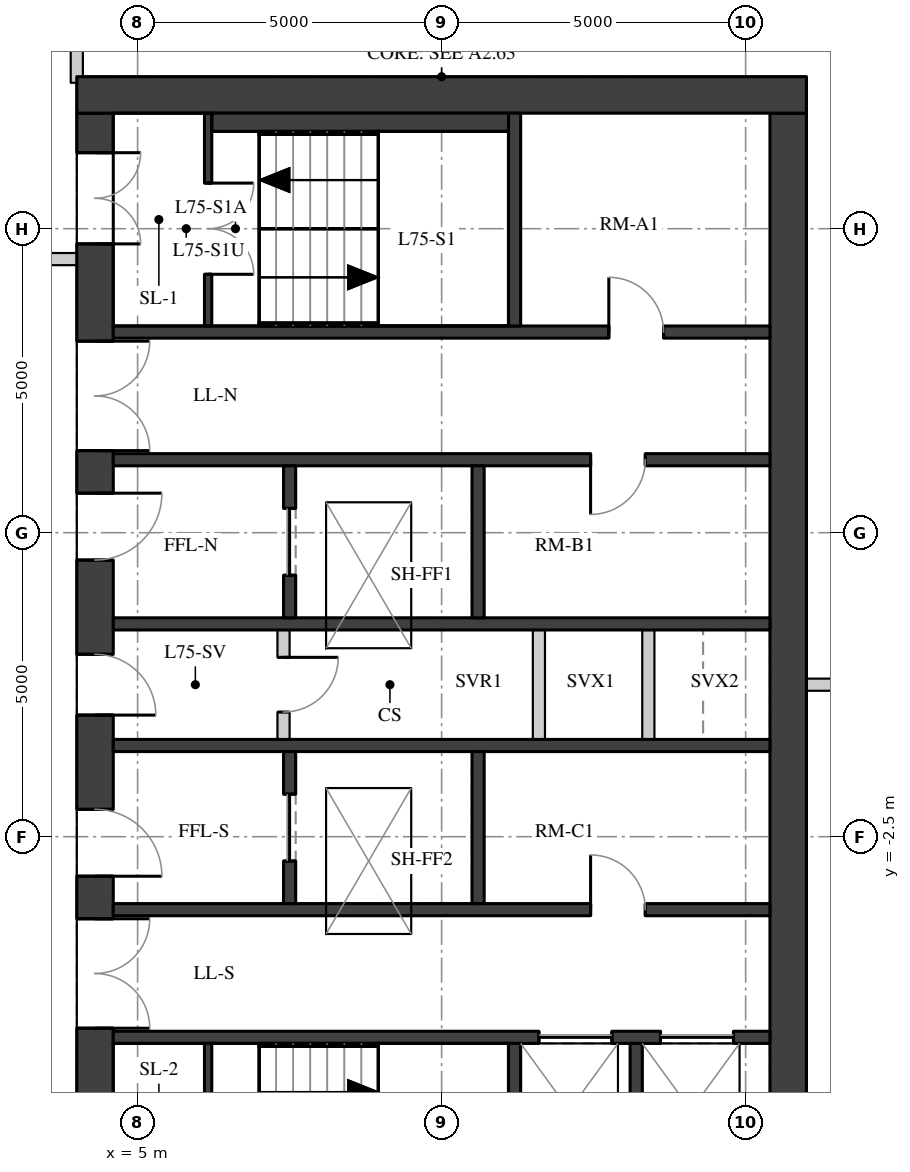
"""IFC4 building model, lengths in metres.
Left out: names, types, materials, properties, quantities, classifications, styles, units other than length and angle.
Written with IfcOpenShell. Run it as: python <this file> out.ifc"""

import sys

from ifc_helpers import new_model, si_unit, direction, frame, frame_2d, origin, place, context, subcontext, project, spatial, rectangle, extrude, element, fill, save


model = new_model("IFC4")
c1 = context("Model", 3, precision=1e-05, world=origin(), true_north=direction((0.0, 1.0)))
c2 = subcontext(c1, "Body", "Model", "MODEL_VIEW")
j1 = project(units=[si_unit("LENGTHUNIT", "METRE"), si_unit("PLANEANGLEUNIT", "RADIAN")], contexts=[c1])
p1 = place(None, origin())
s1 = spatial("IfcSite", under=j1, at=p1, CompositionType="ELEMENT")
p2 = place(p1, origin())
s2 = spatial("IfcBuilding", under=s1, at=p2, CompositionType="ELEMENT")
p3 = place(p2, frame((0.0, 0.0, 264.2)))
s3 = spatial("IfcBuildingStorey", under=s2, at=p3, CompositionType="ELEMENT", Elevation=264.2)
p4 = place(p3, frame((4.3, -9.4, 0.0), z_axis=(0.0, 0.0, 1.0), x_axis=(0.0, 1.0, 0.0)))
e1 = element("IfcWall", 1, at=p4, inside=s3, PredefinedType="SHEAR", context=c2, shape_type="SweptSolid", body=[
    extrude(rectangle(XDim=18.8, YDim=0.6, at=frame_2d((9.4, 0.0))), origin(), (0.0, 0.0, 1.0), 4.59),
])
p5 = place(p4, frame((0.65, 0.0, 0.0)))
e2 = element("IfcOpeningElement", 2, at=p5, cuts=e1, PredefinedType="OPENING", context=c2, shape_type="SweptSolid", body=[
    extrude(rectangle(XDim=1.5, YDim=2.1, at=frame_2d((0.75, 1.05))), frame((0.0, 0.31, 0.0), z_axis=(0.0, -1.0, 0.0), x_axis=(1.0, 0.0, 0.0)), (0.0, 0.0, 1.0), 0.62),
])
p6 = place(p4, frame((3.75, 0.0, 0.0)))
e3 = element("IfcOpeningElement", 3, at=p6, cuts=e1, PredefinedType="OPENING", context=c2, shape_type="SweptSolid", body=[
    extrude(rectangle(XDim=1.8, YDim=2.1, at=frame_2d((0.9, 1.05))), frame((0.0, 0.31, 0.0), z_axis=(0.0, -1.0, 0.0), x_axis=(1.0, 0.0, 0.0)), (0.0, 0.0, 1.0), 0.62),
])
p7 = place(p4, frame((6.25, 0.0, 0.0)))
e4 = element("IfcOpeningElement", 4, at=p7, cuts=e1, PredefinedType="OPENING", context=c2, shape_type="SweptSolid", body=[
    extrude(rectangle(XDim=1.1, YDim=2.1, at=frame_2d((0.55, 1.05))), frame((0.0, 0.31, 0.0), z_axis=(0.0, -1.0, 0.0), x_axis=(1.0, 0.0, 0.0)), (0.0, 0.0, 1.0), 0.62),
])
p8 = place(p4, frame((8.9, 0.0, 0.0)))
e5 = element("IfcOpeningElement", 5, at=p8, cuts=e1, PredefinedType="OPENING", context=c2, shape_type="SweptSolid", body=[
    extrude(rectangle(XDim=1.0, YDim=2.1, at=frame_2d((0.5, 1.05))), frame((0.0, 0.31, 0.0), z_axis=(0.0, -1.0, 0.0), x_axis=(1.0, 0.0, 0.0)), (0.0, 0.0, 1.0), 0.62),
])
p9 = place(p4, frame((11.45, 0.0, 0.0)))
e6 = element("IfcOpeningElement", 6, at=p9, cuts=e1, PredefinedType="OPENING", context=c2, shape_type="SweptSolid", body=[
    extrude(rectangle(XDim=1.1, YDim=2.1, at=frame_2d((0.55, 1.05))), frame((0.0, 0.31, 0.0), z_axis=(0.0, -1.0, 0.0), x_axis=(1.0, 0.0, 0.0)), (0.0, 0.0, 1.0), 0.62),
])
p10 = place(p4, frame((13.25, 0.0, 0.0)))
e7 = element("IfcOpeningElement", 7, at=p10, cuts=e1, PredefinedType="OPENING", context=c2, shape_type="SweptSolid", body=[
    extrude(rectangle(XDim=1.8, YDim=2.1, at=frame_2d((0.9, 1.05))), frame((0.0, 0.31, 0.0), z_axis=(0.0, -1.0, 0.0), x_axis=(1.0, 0.0, 0.0)), (0.0, 0.0, 1.0), 0.62),
])
p11 = place(p4, frame((16.65, 0.0, 0.0)))
e8 = element("IfcOpeningElement", 8, at=p11, cuts=e1, PredefinedType="OPENING", context=c2, shape_type="SweptSolid", body=[
    extrude(rectangle(XDim=1.5, YDim=2.1, at=frame_2d((0.75, 1.05))), frame((0.0, 0.31, 0.0), z_axis=(0.0, -1.0, 0.0), x_axis=(1.0, 0.0, 0.0)), (0.0, 0.0, 1.0), 0.62),
])
p12 = place(p3, frame((15.7, -9.4, 0.0), z_axis=(0.0, 0.0, 1.0), x_axis=(0.0, 1.0, 0.0)))
e9 = element("IfcWall", 9, at=p12, inside=s3, PredefinedType="SHEAR", context=c2, shape_type="SweptSolid", body=[
    extrude(rectangle(XDim=18.8, YDim=0.6, at=frame_2d((9.4, 0.0))), origin(), (0.0, 0.0, 1.0), 4.59),
])
p13 = place(p3, frame((4.0, 9.7, 0.0), z_axis=(0.0, 0.0, 1.0), x_axis=(1.0, 0.0, 0.0)))
e10 = element("IfcWall", 10, at=p13, inside=s3, PredefinedType="SHEAR", context=c2, shape_type="SweptSolid", body=[
    extrude(rectangle(XDim=12.0, YDim=0.6, at=frame_2d((6.0, 0.0))), origin(), (0.0, 0.0, 1.0), 4.59),
])
p14 = place(p3, frame((4.6, 5.8, 0.0), z_axis=(0.0, 0.0, 1.0), x_axis=(1.0, 0.0, 0.0)))
e11 = element("IfcWall", 11, at=p14, inside=s3, PredefinedType="SHEAR", context=c2, shape_type="SweptSolid", body=[
    extrude(rectangle(XDim=10.8, YDim=0.2, at=frame_2d((5.4, 0.0))), origin(), (0.0, 0.0, 1.0), 4.59),
])
p15 = place(p14, frame((8.15, 0.0, 0.0)))
e12 = element("IfcOpeningElement", 12, at=p15, cuts=e11, PredefinedType="OPENING", context=c2, shape_type="SweptSolid", body=[
    extrude(rectangle(XDim=0.9, YDim=2.1, at=frame_2d((0.45, 1.05))), frame((0.0, 0.11, 0.0), z_axis=(0.0, -1.0, 0.0), x_axis=(1.0, 0.0, 0.0)), (0.0, 0.0, 1.0), 0.22),
])
p16 = place(p3, frame((4.6, 3.7, 0.0), z_axis=(0.0, 0.0, 1.0), x_axis=(1.0, 0.0, 0.0)))
e13 = element("IfcWall", 13, at=p16, inside=s3, PredefinedType="SHEAR", context=c2, shape_type="SweptSolid", body=[
    extrude(rectangle(XDim=10.8, YDim=0.2, at=frame_2d((5.4, 0.0))), origin(), (0.0, 0.0, 1.0), 4.59),
])
p17 = place(p16, frame((7.85, 0.0, 0.0)))
e14 = element("IfcOpeningElement", 14, at=p17, cuts=e13, PredefinedType="OPENING", context=c2, shape_type="SweptSolid", body=[
    extrude(rectangle(XDim=0.9, YDim=2.1, at=frame_2d((0.45, 1.05))), frame((0.0, 0.11, 0.0), z_axis=(0.0, -1.0, 0.0), x_axis=(1.0, 0.0, 0.0)), (0.0, 0.0, 1.0), 0.22),
])
for number, where, z_axis, x_axis in (
    (15, (4.6, 1.0, 0.0), (0.0, 0.0, 1.0), (1.0, 0.0, 0.0)),
    (16, (4.6, -1.0, 0.0), (0.0, 0.0, 1.0), (1.0, 0.0, 0.0)),
):
    element("IfcWall", number, at=place(p3, frame(where, z_axis=z_axis, x_axis=x_axis)), inside=s3, PredefinedType="SHEAR", context=c2, shape_type="SweptSolid", body=[
        extrude(rectangle(XDim=10.8, YDim=0.2, at=frame_2d((5.4, 0.0))), origin(), (0.0, 0.0, 1.0), 4.59),
    ])
p18 = place(p3, frame((4.6, -3.7, 0.0), z_axis=(0.0, 0.0, 1.0), x_axis=(1.0, 0.0, 0.0)))
e17 = element("IfcWall", 17, at=p18, inside=s3, PredefinedType="SHEAR", context=c2, shape_type="SweptSolid", body=[
    extrude(rectangle(XDim=10.8, YDim=0.2, at=frame_2d((5.4, 0.0))), origin(), (0.0, 0.0, 1.0), 4.59),
])
p19 = place(p18, frame((7.85, 0.0, 0.0)))
e18 = element("IfcOpeningElement", 18, at=p19, cuts=e17, PredefinedType="OPENING", context=c2, shape_type="SweptSolid", body=[
    extrude(rectangle(XDim=0.9, YDim=2.1, at=frame_2d((0.45, 1.05))), frame((0.0, 0.11, 0.0), z_axis=(0.0, -1.0, 0.0), x_axis=(1.0, 0.0, 0.0)), (0.0, 0.0, 1.0), 0.22),
])
p20 = place(p3, frame((4.6, -5.8, 0.0), z_axis=(0.0, 0.0, 1.0), x_axis=(1.0, 0.0, 0.0)))
e19 = element("IfcWall", 19, at=p20, inside=s3, PredefinedType="SHEAR", context=c2, shape_type="SweptSolid", body=[
    extrude(rectangle(XDim=10.8, YDim=0.2, at=frame_2d((5.4, 0.0))), origin(), (0.0, 0.0, 1.0), 4.59),
])
p21 = place(p20, frame((7.0, 0.0, 0.0)))
e20 = element("IfcOpeningElement", 20, at=p21, cuts=e19, PredefinedType="OPENING", context=c2, shape_type="SweptSolid", body=[
    extrude(rectangle(XDim=1.2, YDim=2.1, at=frame_2d((0.6, 1.05))), frame((0.0, 0.11, 0.0), z_axis=(0.0, -1.0, 0.0), x_axis=(1.0, 0.0, 0.0)), (0.0, 0.0, 1.0), 0.22),
])
p22 = place(p20, frame((9.0, 0.0, 0.0)))
e21 = element("IfcOpeningElement", 21, at=p22, cuts=e19, PredefinedType="OPENING", context=c2, shape_type="SweptSolid", body=[
    extrude(rectangle(XDim=1.2, YDim=2.1, at=frame_2d((0.6, 1.05))), frame((0.0, 0.11, 0.0), z_axis=(0.0, -1.0, 0.0), x_axis=(1.0, 0.0, 0.0)), (0.0, 0.0, 1.0), 0.22),
])
for number, where, z_axis, x_axis in (
    (22, (11.2, 5.9, 0.0), (0.0, 0.0, 1.0), (0.0, 1.0, 0.0)),
    (23, (11.2, -9.4, 0.0), (0.0, 0.0, 1.0), (0.0, 1.0, 0.0)),
    (24, (13.2, -9.4, 0.0), (0.0, 0.0, 1.0), (0.0, 1.0, 0.0)),
):
    element("IfcWall", number, at=place(p3, frame(where, z_axis=z_axis, x_axis=x_axis)), inside=s3, PredefinedType="SHEAR", context=c2, shape_type="SweptSolid", body=[
        extrude(rectangle(XDim=3.5, YDim=0.2, at=frame_2d((1.75, 0.0))), origin(), (0.0, 0.0, 1.0), 4.59),
    ])
p23 = place(p3, frame((7.5, 1.1, 0.0), z_axis=(0.0, 0.0, 1.0), x_axis=(0.0, 1.0, 0.0)))
e25 = element("IfcWall", 25, at=p23, inside=s3, PredefinedType="SHEAR", context=c2, shape_type="SweptSolid", body=[
    extrude(rectangle(XDim=2.5, YDim=0.2, at=frame_2d((1.25, 0.0))), origin(), (0.0, 0.0, 1.0), 4.59),
])
p24 = place(p23, frame((0.7, 0.0, 0.0)))
e26 = element("IfcOpeningElement", 26, at=p24, cuts=e25, PredefinedType="OPENING", context=c2, shape_type="SweptSolid", body=[
    extrude(rectangle(XDim=1.1, YDim=2.1, at=frame_2d((0.55, 1.05))), frame((0.0, 0.11, 0.0), z_axis=(0.0, -1.0, 0.0), x_axis=(1.0, 0.0, 0.0)), (0.0, 0.0, 1.0), 0.22),
])
p25 = place(p3, frame((7.5, -3.6, 0.0), z_axis=(0.0, 0.0, 1.0), x_axis=(0.0, 1.0, 0.0)))
e27 = element("IfcWall", 27, at=p25, inside=s3, PredefinedType="SHEAR", context=c2, shape_type="SweptSolid", body=[
    extrude(rectangle(XDim=2.5, YDim=0.2, at=frame_2d((1.25, 0.0))), origin(), (0.0, 0.0, 1.0), 4.59),
])
p26 = place(p25, frame((0.7, 0.0, 0.0)))
e28 = element("IfcOpeningElement", 28, at=p26, cuts=e27, PredefinedType="OPENING", context=c2, shape_type="SweptSolid", body=[
    extrude(rectangle(XDim=1.1, YDim=2.1, at=frame_2d((0.55, 1.05))), frame((0.0, 0.11, 0.0), z_axis=(0.0, -1.0, 0.0), x_axis=(1.0, 0.0, 0.0)), (0.0, 0.0, 1.0), 0.22),
])
for number, where, z_axis, x_axis in (
    (29, (10.6, 1.1, 0.0), (0.0, 0.0, 1.0), (0.0, 1.0, 0.0)),
    (30, (10.6, -3.6, 0.0), (0.0, 0.0, 1.0), (0.0, 1.0, 0.0)),
):
    element("IfcWall", number, at=place(p3, frame(where, z_axis=z_axis, x_axis=x_axis)), inside=s3, PredefinedType="SHEAR", context=c2, shape_type="SweptSolid", body=[
        extrude(rectangle(XDim=2.5, YDim=0.2, at=frame_2d((1.25, 0.0))), origin(), (0.0, 0.0, 1.0), 4.59),
    ])
p27 = place(p3, frame((6.16, 5.9, 0.0), z_axis=(0.0, 0.0, 1.0), x_axis=(0.0, 1.0, 0.0)))
e31 = element("IfcWall", 31, at=p27, inside=s3, PredefinedType="SHEAR", context=c2, shape_type="SweptSolid", body=[
    extrude(rectangle(XDim=3.5, YDim=0.12, at=frame_2d((1.75, 0.0))), origin(), (0.0, 0.0, 1.0), 2.29),
])
p28 = place(p27, frame((0.85, 0.0, 0.0)))
e32 = element("IfcOpeningElement", 32, at=p28, cuts=e31, PredefinedType="OPENING", context=c2, shape_type="SweptSolid", body=[
    extrude(rectangle(XDim=1.5, YDim=2.1, at=frame_2d((0.75, 1.05))), frame((0.0, 0.07, 0.0), z_axis=(0.0, -1.0, 0.0), x_axis=(1.0, 0.0, 0.0)), (0.0, 0.0, 1.0), 0.14),
])
p29 = place(p3, frame((6.16, -9.4, 0.0), z_axis=(0.0, 0.0, 1.0), x_axis=(0.0, 1.0, 0.0)))
e33 = element("IfcWall", 33, at=p29, inside=s3, PredefinedType="SHEAR", context=c2, shape_type="SweptSolid", body=[
    extrude(rectangle(XDim=3.5, YDim=0.12, at=frame_2d((1.75, 0.0))), origin(), (0.0, 0.0, 1.0), 2.29),
])
p30 = place(p29, frame((1.15, 0.0, 0.0)))
e34 = element("IfcOpeningElement", 34, at=p30, cuts=e33, PredefinedType="OPENING", context=c2, shape_type="SweptSolid", body=[
    extrude(rectangle(XDim=1.5, YDim=2.1, at=frame_2d((0.75, 1.05))), frame((0.0, 0.07, 0.0), z_axis=(0.0, -1.0, 0.0), x_axis=(1.0, 0.0, 0.0)), (0.0, 0.0, 1.0), 0.14),
])
p31 = place(p3, frame((7.4, -0.9, 0.0), z_axis=(0.0, 0.0, 1.0), x_axis=(0.0, 1.0, 0.0)))
e35 = element("IfcWall", 35, at=p31, inside=s3, PredefinedType="PARTITIONING", context=c2, shape_type="SweptSolid", body=[
    extrude(rectangle(XDim=1.8, YDim=0.2, at=frame_2d((0.9, 0.0))), origin(), (0.0, 0.0, 1.0), 4.59),
])
p32 = place(p31, frame((0.45, 0.0, 0.0)))
e36 = element("IfcOpeningElement", 36, at=p32, cuts=e35, PredefinedType="OPENING", context=c2, shape_type="SweptSolid", body=[
    extrude(rectangle(XDim=0.9, YDim=2.1, at=frame_2d((0.45, 1.05))), frame((0.0, 0.11, 0.0), z_axis=(0.0, -1.0, 0.0), x_axis=(1.0, 0.0, 0.0)), (0.0, 0.0, 1.0), 0.22),
])
for number, where, z_axis, x_axis in (
    (37, (11.6, -0.9, 0.0), (0.0, 0.0, 1.0), (0.0, 1.0, 0.0)),
    (38, (13.4, -0.9, 0.0), (0.0, 0.0, 1.0), (0.0, 1.0, 0.0)),
):
    element("IfcWall", number, at=place(p3, frame(where, z_axis=z_axis, x_axis=x_axis)), inside=s3, PredefinedType="PARTITIONING", context=c2, shape_type="SweptSolid", body=[
        extrude(rectangle(XDim=1.8, YDim=0.2, at=frame_2d((0.9, 0.0))), origin(), (0.0, 0.0, 1.0), 4.59),
    ])
p33 = place(p3, frame((6.22, 9.25, 0.0), z_axis=(0.0, 0.0, 1.0), x_axis=(1.0, 0.0, 0.0)))
e39 = element("IfcWall", 39, at=p33, inside=s3, PredefinedType="PARTITIONING", context=c2, shape_type="SweptSolid", body=[
    extrude(rectangle(XDim=4.88, YDim=0.3, at=frame_2d((2.44, 0.0))), origin(), (0.0, 0.0, 1.0), 4.59),
])
p34 = place(p3, frame((15.998, 0.0, 0.0), z_axis=(0.0, 0.0, 1.0), x_axis=(1.0, 0.0, 0.0)))
e40 = element("IfcWall", 40, at=p34, inside=s3, PredefinedType="PARTITIONING", context=c2, shape_type="SweptSolid", body=[
    extrude(rectangle(XDim=8.232, YDim=0.2, at=frame_2d((4.116, 0.0))), origin(), (0.0, 0.0, 1.0), 4.14),
])
p35 = place(p3, frame((-9.6, 7.0, 0.0), z_axis=(0.0, 0.0, 1.0), x_axis=(1.0, 0.0, 0.0)))
e41 = element("IfcWall", 41, at=p35, inside=s3, PredefinedType="PARTITIONING", context=c2, shape_type="SweptSolid", body=[
    extrude(rectangle(XDim=13.602, YDim=0.2, at=frame_2d((6.801, 0.0))), origin(), (0.0, 0.0, 1.0), 4.04),
])
p36 = place(p35, frame((9.201, 0.0, 0.0)))
e42 = element("IfcOpeningElement", 42, at=p36, cuts=e41, PredefinedType="OPENING", context=c2, shape_type="SweptSolid", body=[
    extrude(rectangle(XDim=1.8, YDim=2.1, at=frame_2d((0.9, 1.05))), frame((0.0, 0.11, 0.0), z_axis=(0.0, -1.0, 0.0), x_axis=(1.0, 0.0, 0.0)), (0.0, 0.0, 1.0), 0.22),
])
p37 = place(p3, frame((4.0, 9.9, 0.0), z_axis=(0.0, 0.0, 1.0), x_axis=(0.0, 1.0, 0.0)))
e43 = element("IfcWall", 43, at=p37, inside=s3, PredefinedType="PARTITIONING", context=c2, shape_type="SweptSolid", body=[
    extrude(rectangle(XDim=4.0, YDim=0.2, at=frame_2d((2.0, 0.0))), origin(), (0.0, 0.0, 1.0), 4.59),
])
p38 = place(p6, origin())
e44 = element("IfcDoor", 44, at=p38, inside=s3, OperationType="DOUBLE_DOOR_SINGLE_SWING", PredefinedType="DOOR", context=c2, shape_type="SweptSolid", body=[
    extrude(rectangle(XDim=1.8, YDim=2.1, at=frame_2d((0.9, 1.05))), frame((0.0, 0.025, 0.0), z_axis=(0.0, -1.0, 0.0), x_axis=(1.0, 0.0, 0.0)), (0.0, 0.0, 1.0), 0.05),
])
fill(e3, e44)
p39 = place(p7, origin())
e45 = element("IfcDoor", 45, at=p39, inside=s3, OperationType="SINGLE_SWING_RIGHT", PredefinedType="DOOR", context=c2, shape_type="SweptSolid", body=[
    extrude(rectangle(XDim=1.1, YDim=2.1, at=frame_2d((0.55, 1.05))), frame((0.0, 0.025, 0.0), z_axis=(0.0, -1.0, 0.0), x_axis=(1.0, 0.0, 0.0)), (0.0, 0.0, 1.0), 0.05),
])
fill(e4, e45)
p40 = place(p8, origin())
e46 = element("IfcDoor", 46, at=p40, inside=s3, OperationType="SINGLE_SWING_RIGHT", PredefinedType="DOOR", context=c2, shape_type="SweptSolid", body=[
    extrude(rectangle(XDim=1.0, YDim=2.1, at=frame_2d((0.5, 1.05))), frame((0.0, 0.025, 0.0), z_axis=(0.0, -1.0, 0.0), x_axis=(1.0, 0.0, 0.0)), (0.0, 0.0, 1.0), 0.05),
])
fill(e5, e46)
p41 = place(p9, origin())
e47 = element("IfcDoor", 47, at=p41, inside=s3, OperationType="SINGLE_SWING_LEFT", PredefinedType="DOOR", context=c2, shape_type="SweptSolid", body=[
    extrude(rectangle(XDim=1.1, YDim=2.1, at=frame_2d((0.55, 1.05))), frame((0.0, 0.025, 0.0), z_axis=(0.0, -1.0, 0.0), x_axis=(1.0, 0.0, 0.0)), (0.0, 0.0, 1.0), 0.05),
])
fill(e6, e47)
p42 = place(p10, origin())
e48 = element("IfcDoor", 48, at=p42, inside=s3, OperationType="DOUBLE_DOOR_SINGLE_SWING", PredefinedType="DOOR", context=c2, shape_type="SweptSolid", body=[
    extrude(rectangle(XDim=1.8, YDim=2.1, at=frame_2d((0.9, 1.05))), frame((0.0, 0.025, 0.0), z_axis=(0.0, -1.0, 0.0), x_axis=(1.0, 0.0, 0.0)), (0.0, 0.0, 1.0), 0.05),
])
fill(e7, e48)
p43 = place(p11, origin())
e49 = element("IfcDoor", 49, at=p43, inside=s3, OperationType="DOUBLE_DOOR_SINGLE_SWING", PredefinedType="DOOR", context=c2, shape_type="SweptSolid", body=[
    extrude(rectangle(XDim=1.5, YDim=2.1, at=frame_2d((0.75, 1.05))), frame((0.0, 0.025, 0.0), z_axis=(0.0, -1.0, 0.0), x_axis=(1.0, 0.0, 0.0)), (0.0, 0.0, 1.0), 0.05),
])
fill(e8, e49)
p44 = place(p28, origin())
e50 = element("IfcDoor", 50, at=p44, inside=s3, OperationType="DOUBLE_DOOR_SINGLE_SWING", PredefinedType="DOOR", context=c2, shape_type="SweptSolid", body=[
    extrude(rectangle(XDim=1.5, YDim=2.1, at=frame_2d((0.75, 1.05))), frame((0.0, 0.025, 0.0), z_axis=(0.0, -1.0, 0.0), x_axis=(1.0, 0.0, 0.0)), (0.0, 0.0, 1.0), 0.05),
])
fill(e32, e50)
p45 = place(p15, origin())
e51 = element("IfcDoor", 51, at=p45, inside=s3, OperationType="SINGLE_SWING_LEFT", PredefinedType="DOOR", context=c2, shape_type="SweptSolid", body=[
    extrude(rectangle(XDim=0.9, YDim=2.1, at=frame_2d((0.45, 1.05))), frame((0.0, 0.025, 0.0), z_axis=(0.0, -1.0, 0.0), x_axis=(1.0, 0.0, 0.0)), (0.0, 0.0, 1.0), 0.05),
])
fill(e12, e51)
p46 = place(p17, origin())
e52 = element("IfcDoor", 52, at=p46, inside=s3, OperationType="SINGLE_SWING_RIGHT", PredefinedType="DOOR", context=c2, shape_type="SweptSolid", body=[
    extrude(rectangle(XDim=0.9, YDim=2.1, at=frame_2d((0.45, 1.05))), frame((0.0, 0.025, 0.0), z_axis=(0.0, -1.0, 0.0), x_axis=(1.0, 0.0, 0.0)), (0.0, 0.0, 1.0), 0.05),
])
fill(e14, e52)
p47 = place(p19, origin())
e53 = element("IfcDoor", 53, at=p47, inside=s3, OperationType="SINGLE_SWING_LEFT", PredefinedType="DOOR", context=c2, shape_type="SweptSolid", body=[
    extrude(rectangle(XDim=0.9, YDim=2.1, at=frame_2d((0.45, 1.05))), frame((0.0, 0.025, 0.0), z_axis=(0.0, -1.0, 0.0), x_axis=(1.0, 0.0, 0.0)), (0.0, 0.0, 1.0), 0.05),
])
fill(e18, e53)
p48 = place(p21, origin())
e54 = element("IfcDoor", 54, at=p48, inside=s3, OperationType="DOUBLE_DOOR_SLIDING", PredefinedType="DOOR", context=c2, shape_type="SweptSolid", body=[
    extrude(rectangle(XDim=1.2, YDim=2.1, at=frame_2d((0.6, 1.05))), frame((0.0, 0.025, 0.0), z_axis=(0.0, -1.0, 0.0), x_axis=(1.0, 0.0, 0.0)), (0.0, 0.0, 1.0), 0.05),
])
fill(e20, e54)
p49 = place(p22, origin())
e55 = element("IfcDoor", 55, at=p49, inside=s3, OperationType="DOUBLE_DOOR_SLIDING", PredefinedType="DOOR", context=c2, shape_type="SweptSolid", body=[
    extrude(rectangle(XDim=1.2, YDim=2.1, at=frame_2d((0.6, 1.05))), frame((0.0, 0.025, 0.0), z_axis=(0.0, -1.0, 0.0), x_axis=(1.0, 0.0, 0.0)), (0.0, 0.0, 1.0), 0.05),
])
fill(e21, e55)
p50 = place(p24, origin())
e56 = element("IfcDoor", 56, at=p50, inside=s3, OperationType="DOUBLE_DOOR_SLIDING", PredefinedType="DOOR", context=c2, shape_type="SweptSolid", body=[
    extrude(rectangle(XDim=1.1, YDim=2.1, at=frame_2d((0.55, 1.05))), frame((0.0, 0.025, 0.0), z_axis=(0.0, -1.0, 0.0), x_axis=(1.0, 0.0, 0.0)), (0.0, 0.0, 1.0), 0.05),
])
fill(e26, e56)
p51 = place(p26, origin())
e57 = element("IfcDoor", 57, at=p51, inside=s3, OperationType="DOUBLE_DOOR_SLIDING", PredefinedType="DOOR", context=c2, shape_type="SweptSolid", body=[
    extrude(rectangle(XDim=1.1, YDim=2.1, at=frame_2d((0.55, 1.05))), frame((0.0, 0.025, 0.0), z_axis=(0.0, -1.0, 0.0), x_axis=(1.0, 0.0, 0.0)), (0.0, 0.0, 1.0), 0.05),
])
fill(e28, e57)
p52 = place(p32, origin())
e58 = element("IfcDoor", 58, at=p52, inside=s3, OperationType="SINGLE_SWING_LEFT", PredefinedType="DOOR", context=c2, shape_type="SweptSolid", body=[
    extrude(rectangle(XDim=0.9, YDim=2.1, at=frame_2d((0.45, 1.05))), frame((0.0, 0.025, 0.0), z_axis=(0.0, -1.0, 0.0), x_axis=(1.0, 0.0, 0.0)), (0.0, 0.0, 1.0), 0.05),
])
fill(e36, e58)
save(model, sys.argv[1])
